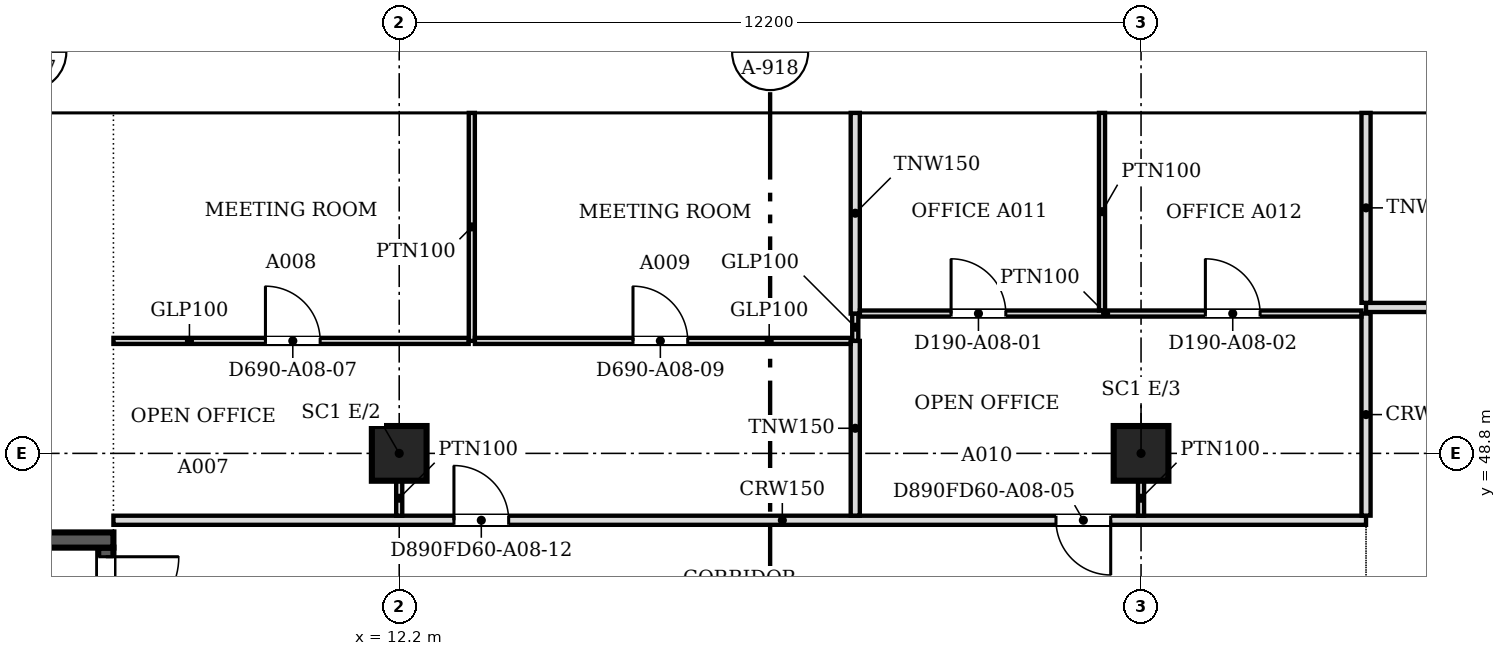
"""IFC4 building model, lengths in metres.
Left out: names, types, materials, properties, quantities, classifications, styles, units other than length and angle.
Written with IfcOpenShell. Run it as: python <this file> out.ifc"""

import sys

from ifc_helpers import new_model, si_unit, direction, frame, frame_2d, origin, origin_2d, place, context, subcontext, project, spatial, polyline, rectangle, outline, extrude, faceted_brep, source, transform, mapped, element, fill, save


model = new_model("IFC4")
c1 = context("Model", 3, precision=1e-05, world=origin(), true_north=direction((0.0, 1.0)))
c2 = subcontext(c1, "Body", "Model", "MODEL_VIEW")
j1 = project(units=[si_unit("LENGTHUNIT", "METRE"), si_unit("PLANEANGLEUNIT", "RADIAN")], contexts=[c1])
p1 = place(None, origin())
s1 = spatial("IfcSite", under=j1, at=p1, CompositionType="ELEMENT")
p2 = place(p1, origin())
s2 = spatial("IfcBuilding", under=s1, at=p2, CompositionType="ELEMENT")
p3 = place(p2, frame((0.0, 0.0, 91.4)))
s3 = spatial("IfcBuildingStorey", under=s2, at=p3, CompositionType="ELEMENT", Elevation=91.4)
for number, where, z_axis, x_axis in (
    (1, (12.2, 48.8, 0.0), (0.0, 0.0, 1.0), (1.0, 0.0, 0.0)),
    (2, (24.4, 48.8, 0.0), (0.0, 0.0, 1.0), (1.0, 0.0, 0.0)),
):
    element("IfcColumn", number, at=place(p3, frame(where, z_axis=z_axis, x_axis=x_axis)), inside=s3, PredefinedType="COLUMN", context=c2, shape_type="SweptSolid", body=[
        extrude(rectangle(XDim=0.9, YDim=0.9, at=origin_2d()), origin(), (0.0, 0.0, 1.0), 3.6),
    ])
m1 = source(origin(), c2, "Body", "SweptSolid", [
    extrude(outline(polyline([(3.05, 0.0), (6.1, 3.8), (3.05, 7.6), (0.0, 3.8), (3.05, 0.0)])), frame((0.0, 0.25, 0.0), z_axis=(0.0, -1.0, 0.0), x_axis=(1.0, 0.0, 0.0)), (0.0, 0.0, 1.0), 0.5),
])
p4 = place(p3, frame((33.55, 54.65, -3.8), z_axis=(0.0, 0.0, 1.0), x_axis=(-1.0, 0.0, 0.0)))
e3 = element("IfcWall", 3, at=p4, inside=s3, PredefinedType="SOLIDWALL", context=c2, shape_type="MappedRepresentation", body=[
    mapped(m1, transform((0.0, 0.0, 0.0), scale=1.0)),
])
m2 = source(origin(), c2, "Body", "SweptSolid", [
    extrude(outline(polyline([(3.05, 0.399), (5.78, 3.8), (3.05, 7.2), (0.321, 3.8), (3.05, 0.399)])), frame((0.0, 0.26, 0.0), z_axis=(0.0, -1.0, 0.0), x_axis=(1.0, 0.0, 0.0)), (0.0, 0.0, 1.0), 0.52),
])
p5 = place(p4, origin())
e4 = element("IfcOpeningElement", 4, at=p5, cuts=e3, PredefinedType="OPENING", context=c2, shape_type="MappedRepresentation", body=[
    mapped(m2, transform((0.0, 0.0, 0.0), scale=1.0)),
])
m3 = source(origin(), c2, "Body", "Brep", [
    faceted_brep([(3.05, -0.25, 0.0), (6.1, -0.25, 3.8), (6.1, -0.25, 3.8), (3.05, -0.25, 7.6), (0.0, -0.25, 3.8), (0.0, 0.25, 3.8), (3.05, 0.25, 7.6), (6.1, 0.25, 3.8), (6.1, 0.25, 3.8), (3.05, 0.25, 0.0)], [[[0, 1, 2, 3, 4]], [[5, 6, 7, 8, 9]], [[9, 8, 1, 0]], [[7, 6, 3, 2]], [[6, 5, 4, 3]], [[5, 9, 0, 4]], [[1, 8, 7, 2]]]),
])
p6 = place(p3, frame((27.45, 54.65, -3.8), z_axis=(0.0, 0.0, 1.0), x_axis=(-1.0, 0.0, 0.0)))
e5 = element("IfcWall", 5, at=p6, inside=s3, PredefinedType="SOLIDWALL", context=c2, shape_type="MappedRepresentation", body=[
    mapped(m3, transform((0.0, 0.0, 0.0), scale=1.0)),
])
p7 = place(p6, origin())
e6 = element("IfcOpeningElement", 6, at=p7, cuts=e5, PredefinedType="OPENING", context=c2, shape_type="MappedRepresentation", body=[
    mapped(m2, transform((0.0, 0.0, 0.0), scale=1.0)),
])
p8 = place(p3, frame((21.35, 54.65, -3.8), z_axis=(0.0, 0.0, 1.0), x_axis=(-1.0, 0.0, 0.0)))
e7 = element("IfcWall", 7, at=p8, inside=s3, PredefinedType="SOLIDWALL", context=c2, shape_type="MappedRepresentation", body=[
    mapped(m1, transform((0.0, 0.0, 0.0), scale=1.0)),
])
p9 = place(p8, origin())
e8 = element("IfcOpeningElement", 8, at=p9, cuts=e7, PredefinedType="OPENING", context=c2, shape_type="MappedRepresentation", body=[
    mapped(m2, transform((0.0, 0.0, 0.0), scale=1.0)),
])
p10 = place(p3, frame((15.25, 54.65, -3.8), z_axis=(0.0, 0.0, 1.0), x_axis=(-1.0, 0.0, 0.0)))
e9 = element("IfcWall", 9, at=p10, inside=s3, PredefinedType="SOLIDWALL", context=c2, shape_type="MappedRepresentation", body=[
    mapped(m1, transform((0.0, 0.0, 0.0), scale=1.0)),
])
p11 = place(p10, origin())
e10 = element("IfcOpeningElement", 10, at=p11, cuts=e9, PredefinedType="OPENING", context=c2, shape_type="MappedRepresentation", body=[
    mapped(m2, transform((0.0, 0.0, 0.0), scale=1.0)),
])
m4 = source(origin(), c2, "Body", "Brep", [
    faceted_brep([(3.003, -0.25, 0.0), (3.05, -0.25, 0.06), (3.05, -0.25, 7.54), (3.003, -0.25, 7.6), (0.0, -0.25, 3.8), (0.0, 0.25, 3.8), (2.957, 0.25, 7.541), (2.957, 0.25, 0.059), (3.003, 0.0, 0.0), (3.003, 0.0, 7.6)], [[[0, 1, 2, 3, 4]], [[5, 6, 7]], [[1, 0, 8]], [[9, 3, 2]], [[6, 5, 4, 3, 9]], [[5, 7, 8, 0, 4]], [[1, 8, 7, 6, 9, 2]]]),
])
p12 = place(p3, frame((9.15, 54.65, -3.8), z_axis=(0.0, 0.0, 1.0), x_axis=(-1.0, 0.0, 0.0)))
e11 = element("IfcWall", 11, at=p12, inside=s3, PredefinedType="SOLIDWALL", context=c2, shape_type="MappedRepresentation", body=[
    mapped(m4, transform((0.0, 0.0, 0.0), scale=1.0)),
])
m5 = source(origin(), c2, "Body", "SweptSolid", [
    extrude(outline(polyline([(2.803, 6.944), (0.319, 3.8), (2.803, 0.656), (2.803, 6.944)])), frame((0.0, 0.26, 0.0), z_axis=(0.0, -1.0, 0.0), x_axis=(1.0, 0.0, 0.0)), (0.0, 0.0, 1.0), 0.52),
])
p13 = place(p12, origin())
e12 = element("IfcOpeningElement", 12, at=p13, cuts=e11, PredefinedType="OPENING", context=c2, shape_type="MappedRepresentation", body=[
    mapped(m5, transform((0.0, 0.0, 0.0), scale=1.0)),
])
p14 = place(p2, frame((0.0, 0.0, 95.2)))
s4 = spatial("IfcBuildingStorey", under=s2, at=p14, CompositionType="ELEMENT", Elevation=95.2)
m6 = source(origin(), c2, "Body", "SweptSolid", [
    extrude(outline(polyline([(3.05, 0.0), (6.1, 3.8), (3.05, 7.6), (0.0, 3.8), (3.05, 0.0)])), frame((0.0, 0.25, 0.0), z_axis=(0.0, -1.0, 0.0), x_axis=(1.0, 0.0, 0.0)), (0.0, 0.0, 1.0), 0.5),
])
p15 = place(p14, frame((30.5, 54.65, -3.8), z_axis=(0.0, 0.0, 1.0), x_axis=(-1.0, 0.0, 0.0)))
e13 = element("IfcWall", 13, at=p15, inside=s4, PredefinedType="SOLIDWALL", context=c2, shape_type="MappedRepresentation", body=[
    mapped(m6, transform((0.0, 0.0, 0.0), scale=1.0)),
])
m7 = source(origin(), c2, "Body", "SweptSolid", [
    extrude(outline(polyline([(3.05, 0.399), (5.78, 3.8), (3.05, 7.201), (0.321, 3.8), (3.05, 0.399)])), frame((0.0, 0.26, 0.0), z_axis=(0.0, -1.0, 0.0), x_axis=(1.0, 0.0, 0.0)), (0.0, 0.0, 1.0), 0.52),
])
p16 = place(p15, origin())
e14 = element("IfcOpeningElement", 14, at=p16, cuts=e13, PredefinedType="OPENING", context=c2, shape_type="MappedRepresentation", body=[
    mapped(m7, transform((0.0, 0.0, 0.0), scale=1.0)),
])
m8 = source(origin(), c2, "Body", "Brep", [
    faceted_brep([(3.05, -0.25, 0.0), (6.1, -0.25, 3.8), (6.1, -0.25, 3.8), (3.05, -0.25, 7.6), (0.0, -0.25, 3.8), (0.0, 0.25, 3.8), (3.05, 0.25, 7.6), (6.1, 0.25, 3.8), (6.1, 0.25, 3.8), (3.05, 0.25, 0.0)], [[[0, 1, 2, 3, 4]], [[5, 6, 7, 8, 9]], [[9, 8, 1, 0]], [[7, 6, 3, 2]], [[6, 5, 4, 3]], [[5, 9, 0, 4]], [[1, 8, 7, 2]]]),
])
p17 = place(p14, frame((24.4, 54.65, -3.8), z_axis=(0.0, 0.0, 1.0), x_axis=(-1.0, 0.0, 0.0)))
e15 = element("IfcWall", 15, at=p17, inside=s4, PredefinedType="SOLIDWALL", context=c2, shape_type="MappedRepresentation", body=[
    mapped(m8, transform((0.0, 0.0, 0.0), scale=1.0)),
])
p18 = place(p17, origin())
e16 = element("IfcOpeningElement", 16, at=p18, cuts=e15, PredefinedType="OPENING", context=c2, shape_type="MappedRepresentation", body=[
    mapped(m7, transform((0.0, 0.0, 0.0), scale=1.0)),
])
p19 = place(p14, frame((18.3, 54.65, -3.8), z_axis=(0.0, 0.0, 1.0), x_axis=(-1.0, 0.0, 0.0)))
e17 = element("IfcWall", 17, at=p19, inside=s4, PredefinedType="SOLIDWALL", context=c2, shape_type="MappedRepresentation", body=[
    mapped(m6, transform((0.0, 0.0, 0.0), scale=1.0)),
])
p20 = place(p19, origin())
e18 = element("IfcOpeningElement", 18, at=p20, cuts=e17, PredefinedType="OPENING", context=c2, shape_type="MappedRepresentation", body=[
    mapped(m7, transform((0.0, 0.0, 0.0), scale=1.0)),
])
m9 = source(origin(), c2, "Body", "Brep", [
    faceted_brep([(3.05, -0.25, 0.0), (6.053, -0.25, 3.8), (3.05, -0.25, 7.6), (0.0, -0.25, 3.8), (0.0, 0.25, 3.8), (3.05, 0.25, 7.6), (6.007, 0.25, 3.859), (6.007, 0.25, 3.741), (3.05, 0.25, 0.0), (6.053, 0.0, 3.8)], [[[0, 1, 2, 3]], [[4, 5, 6, 7, 8]], [[8, 7, 9, 1, 0]], [[6, 5, 2, 1, 9]], [[5, 4, 3, 2]], [[4, 8, 0, 3]], [[9, 7, 6]]]),
])
p21 = place(p14, frame((12.2, 54.65, -3.8), z_axis=(0.0, 0.0, 1.0), x_axis=(-1.0, 0.0, 0.0)))
e19 = element("IfcWall", 19, at=p21, inside=s4, PredefinedType="SOLIDWALL", context=c2, shape_type="MappedRepresentation", body=[
    mapped(m9, transform((0.0, 0.0, 0.0), scale=1.0)),
])
m10 = source(origin(), c2, "Body", "SweptSolid", [
    extrude(outline(polyline([(3.049, 0.401), (5.735, 3.8), (3.049, 7.199), (0.321, 3.8), (3.049, 0.401)])), frame((0.0, 0.26, 0.0), z_axis=(0.0, -1.0, 0.0), x_axis=(1.0, 0.0, 0.0)), (0.0, 0.0, 1.0), 0.52),
])
p22 = place(p21, origin())
e20 = element("IfcOpeningElement", 20, at=p22, cuts=e19, PredefinedType="OPENING", context=c2, shape_type="MappedRepresentation", body=[
    mapped(m10, transform((0.0, 0.0, 0.0), scale=1.0)),
])
p23 = place(p3, frame((3.6, 47.375, 0.0), z_axis=(0.0, 0.0, 1.0), x_axis=(1.0, 0.0, 0.0)))
e21 = element("IfcWall", 21, at=p23, inside=s3, PredefinedType="SOLIDWALL", context=c2, shape_type="SweptSolid", body=[
    extrude(rectangle(XDim=3.9, YDim=0.25, at=frame_2d((1.95, 0.0))), origin(), (0.0, 0.0, 1.0), 3.8),
])
p24 = place(p3, frame((7.375, 47.25, 0.0), z_axis=(0.0, 0.0, 1.0), x_axis=(0.0, -1.0, 0.0)))
e22 = element("IfcWall", 22, at=p24, inside=s3, PredefinedType="SOLIDWALL", context=c2, shape_type="SweptSolid", body=[
    extrude(rectangle(XDim=8.0, YDim=0.25, at=frame_2d((4.0, 0.0))), origin(), (0.0, 0.0, 1.0), 3.8),
])
m11 = source(origin(), c2, "Body", "SweptSolid", [
    extrude(rectangle(XDim=1.2, YDim=2.1, at=frame_2d((0.6, 1.05))), frame((0.0, 0.135, 0.0), z_axis=(0.0, -1.0, 0.0), x_axis=(1.0, 0.0, 0.0)), (0.0, 0.0, 1.0), 0.27),
])
p25 = place(p24, frame((0.15, 0.0, 0.0)))
e23 = element("IfcOpeningElement", 23, at=p25, cuts=e22, PredefinedType="OPENING", context=c2, shape_type="MappedRepresentation", body=[
    mapped(m11, transform((0.0, 0.0, 0.0), scale=1.0)),
])
p26 = place(p3, frame((7.5, 47.7, 0.0), z_axis=(0.0, 0.0, 1.0), x_axis=(1.0, 0.0, 0.0)))
e24 = element("IfcWall", 24, at=p26, inside=s3, PredefinedType="PARTITIONING", context=c2, shape_type="SweptSolid", body=[
    extrude(rectangle(XDim=20.6, YDim=0.15, at=frame_2d((10.3, 0.0))), origin(), (0.0, 0.0, 1.0), 2.895),
])
m12 = source(origin(), c2, "Body", "SweptSolid", [
    extrude(rectangle(XDim=0.9, YDim=2.1, at=frame_2d((0.45, 1.05))), frame((0.0, 0.085, 0.0), z_axis=(0.0, -1.0, 0.0), x_axis=(1.0, 0.0, 0.0)), (0.0, 0.0, 1.0), 0.17),
])
p27 = place(p26, frame((15.501, 0.0, 0.0)))
e25 = element("IfcOpeningElement", 25, at=p27, cuts=e24, PredefinedType="OPENING", context=c2, shape_type="MappedRepresentation", body=[
    mapped(m12, transform((0.0, 0.0, 0.0), scale=1.0)),
])
p28 = place(p26, frame((5.6, 0.0, 0.0)))
e26 = element("IfcOpeningElement", 26, at=p28, cuts=e24, PredefinedType="OPENING", context=c2, shape_type="MappedRepresentation", body=[
    mapped(m12, transform((0.0, 0.0, 0.0), scale=1.0)),
])
p29 = place(p3, frame((19.7, 47.776, 0.0), z_axis=(0.0, 0.0, 1.0), x_axis=(0.0, 1.0, 0.0)))
e27 = element("IfcWall", 27, at=p29, inside=s3, PredefinedType="PARTITIONING", context=c2, shape_type="SweptSolid", body=[
    extrude(rectangle(XDim=2.874, YDim=0.15, at=frame_2d((1.437, 0.0))), origin(), (0.0, 0.0, 1.0), 2.895),
])
p30 = place(p3, frame((28.1, 47.776, 0.0), z_axis=(0.0, 0.0, 1.0), x_axis=(0.0, 1.0, 0.0)))
e28 = element("IfcWall", 28, at=p30, inside=s3, PredefinedType="PARTITIONING", context=c2, shape_type="SweptSolid", body=[
    extrude(rectangle(XDim=3.324, YDim=0.15, at=frame_2d((1.662, 0.0))), origin(), (0.0, 0.0, 1.0), 2.895),
])
for number, where, z_axis, x_axis in (
    (29, (12.2, 48.35, 0.0), (0.0, 0.0, 1.0), (0.0, -1.0, 0.0)),
    (30, (24.4, 48.35, 0.0), (0.0, 0.0, 1.0), (0.0, -1.0, 0.0)),
):
    element("IfcWall", number, at=place(p3, frame(where, z_axis=z_axis, x_axis=x_axis)), inside=s3, PredefinedType="PARTITIONING", context=c2, shape_type="SweptSolid", body=[
        extrude(rectangle(XDim=0.575, YDim=0.1, at=frame_2d((0.288, 0.0))), origin(), (0.0, 0.0, 1.0), 2.895),
    ])
p31 = place(p3, frame((7.5, 50.65, 0.0), z_axis=(0.0, 0.0, 1.0), x_axis=(1.0, 0.0, 0.0)))
e31 = element("IfcWall", 31, at=p31, inside=s3, PredefinedType="PARTITIONING", context=c2, shape_type="SweptSolid", body=[
    extrude(rectangle(XDim=5.843, YDim=0.1, at=frame_2d((2.921, 0.0))), origin(), (0.0, 0.0, 1.0), 2.895),
])
m13 = source(origin(), c2, "Body", "SweptSolid", [
    extrude(rectangle(XDim=0.9, YDim=2.1, at=frame_2d((0.45, 1.05))), frame((0.0, 0.06, 0.0), z_axis=(0.0, -1.0, 0.0), x_axis=(1.0, 0.0, 0.0)), (0.0, 0.0, 1.0), 0.12),
])
p32 = place(p31, frame((2.5, 0.0, 0.0)))
e32 = element("IfcOpeningElement", 32, at=p32, cuts=e31, PredefinedType="OPENING", context=c2, shape_type="MappedRepresentation", body=[
    mapped(m13, transform((0.0, 0.0, 0.0), scale=1.0)),
])
p33 = place(p3, frame((13.394, 50.65, 0.0), z_axis=(0.0, 0.0, 1.0), x_axis=(0.0, 1.0, 0.0)))
e33 = element("IfcWall", 33, at=p33, inside=s3, PredefinedType="PARTITIONING", context=c2, shape_type="SweptSolid", body=[
    extrude(rectangle(XDim=3.75, YDim=0.1, at=frame_2d((1.875, 0.0))), origin(), (0.0, 0.0, 1.0), 2.895),
])
p34 = place(p3, frame((13.445, 50.65, 0.0), z_axis=(0.0, 0.0, 1.0), x_axis=(1.0, 0.0, 0.0)))
e34 = element("IfcWall", 34, at=p34, inside=s3, PredefinedType="PARTITIONING", context=c2, shape_type="SweptSolid", body=[
    extrude(rectangle(XDim=6.179, YDim=0.1, at=frame_2d((3.09, 0.0))), origin(), (0.0, 0.0, 1.0), 2.895),
])
p35 = place(p34, frame((2.6, 0.0, 0.0)))
e35 = element("IfcOpeningElement", 35, at=p35, cuts=e34, PredefinedType="OPENING", context=c2, shape_type="MappedRepresentation", body=[
    mapped(m13, transform((0.0, 0.0, 0.0), scale=1.0)),
])
p36 = place(p3, frame((19.7, 50.651, 0.0), z_axis=(0.0, 0.0, 1.0), x_axis=(0.0, 1.0, 0.0)))
e36 = element("IfcWall", 36, at=p36, inside=s3, PredefinedType="PARTITIONING", context=c2, shape_type="SweptSolid", body=[
    extrude(rectangle(XDim=0.448, YDim=0.1, at=frame_2d((0.224, 0.0))), origin(), (0.0, 0.0, 1.0), 2.895),
])
p37 = place(p3, frame((19.7, 51.1, 0.0), z_axis=(0.0, 0.0, 1.0), x_axis=(0.0, 1.0, 0.0)))
e37 = element("IfcWall", 37, at=p37, inside=s3, PredefinedType="PARTITIONING", context=c2, shape_type="SweptSolid", body=[
    extrude(rectangle(XDim=3.3, YDim=0.15, at=frame_2d((1.65, 0.0))), origin(), (0.0, 0.0, 1.0), 2.895),
])
p38 = place(p3, frame((19.776, 51.1, 0.0), z_axis=(0.0, 0.0, 1.0), x_axis=(1.0, 0.0, 0.0)))
e38 = element("IfcWall", 38, at=p38, inside=s3, PredefinedType="PARTITIONING", context=c2, shape_type="SweptSolid", body=[
    extrude(rectangle(XDim=8.248, YDim=0.1, at=frame_2d((4.124, 0.0))), origin(), (0.0, 0.0, 1.0), 2.895),
])
p39 = place(p38, frame((1.5, 0.0, 0.0)))
e39 = element("IfcOpeningElement", 39, at=p39, cuts=e38, PredefinedType="OPENING", context=c2, shape_type="MappedRepresentation", body=[
    mapped(m13, transform((0.0, 0.0, 0.0), scale=1.0)),
])
p40 = place(p38, frame((5.682, 0.0, 0.0)))
e40 = element("IfcOpeningElement", 40, at=p40, cuts=e38, PredefinedType="OPENING", context=c2, shape_type="MappedRepresentation", body=[
    mapped(m13, transform((0.0, 0.0, 0.0), scale=1.0)),
])
p41 = place(p3, frame((23.758, 51.151, 0.0), z_axis=(0.0, 0.0, 1.0), x_axis=(0.0, 1.0, 0.0)))
e41 = element("IfcWall", 41, at=p41, inside=s3, PredefinedType="PARTITIONING", context=c2, shape_type="SweptSolid", body=[
    extrude(rectangle(XDim=3.249, YDim=0.1, at=frame_2d((1.625, 0.0))), origin(), (0.0, 0.0, 1.0), 2.895),
])
p42 = place(p3, frame((28.1, 51.2, 0.0), z_axis=(0.0, 0.0, 1.0), x_axis=(1.0, 0.0, 0.0)))
e42 = element("IfcWall", 42, at=p42, inside=s3, PredefinedType="PARTITIONING", context=c2, shape_type="SweptSolid", body=[
    extrude(rectangle(XDim=31.438, YDim=0.15, at=frame_2d((15.719, 0.0))), origin(), (0.0, 0.0, 1.0), 2.895),
])
p43 = place(p42, frame((13.251, 0.0, 0.0)))
e43 = element("IfcOpeningElement", 43, at=p43, cuts=e42, PredefinedType="OPENING", context=c2, shape_type="MappedRepresentation", body=[
    mapped(m12, transform((0.0, 0.0, 0.0), scale=1.0)),
])
p44 = place(p42, frame((4.1, 0.0, 0.0)))
e44 = element("IfcOpeningElement", 44, at=p44, cuts=e42, PredefinedType="OPENING", context=c2, shape_type="MappedRepresentation", body=[
    mapped(m12, transform((0.0, 0.0, 0.0), scale=1.0)),
])
p45 = place(p42, frame((24.4, 0.0, 0.0)))
e45 = element("IfcOpeningElement", 45, at=p45, cuts=e42, PredefinedType="OPENING", context=c2, shape_type="MappedRepresentation", body=[
    mapped(m12, transform((0.0, 0.0, 0.0), scale=1.0)),
])
p46 = place(p3, frame((28.1, 51.276, 0.0), z_axis=(0.0, 0.0, 1.0), x_axis=(0.0, 1.0, 0.0)))
e46 = element("IfcWall", 46, at=p46, inside=s3, PredefinedType="PARTITIONING", context=c2, shape_type="SweptSolid", body=[
    extrude(rectangle(XDim=3.124, YDim=0.15, at=frame_2d((1.562, 0.0))), origin(), (0.0, 0.0, 1.0), 2.895),
])
m14 = source(origin(), c2, "Body", "SweptSolid", [
    extrude(rectangle(XDim=1.2, YDim=2.1, at=frame_2d((0.6, 1.05))), frame((0.0, 0.025, 0.0), z_axis=(0.0, -1.0, 0.0), x_axis=(1.0, 0.0, 0.0)), (0.0, 0.0, 1.0), 0.05),
])
p47 = place(p25, origin())
e47 = element("IfcDoor", 47, at=p47, inside=s3, OperationType="SINGLE_SWING_LEFT", PredefinedType="DOOR", context=c2, shape_type="MappedRepresentation", body=[
    mapped(m14, transform((0.0, 0.0, 0.0), scale=1.0)),
])
fill(e23, e47)
m15 = source(origin(), c2, "Body", "SweptSolid", [
    extrude(rectangle(XDim=0.9, YDim=2.1, at=frame_2d((0.45, 1.05))), frame((0.0, 0.025, 0.0), z_axis=(0.0, -1.0, 0.0), x_axis=(1.0, 0.0, 0.0)), (0.0, 0.0, 1.0), 0.05),
])
p48 = place(p39, origin())
e48 = element("IfcDoor", 48, at=p48, inside=s3, OperationType="SINGLE_SWING_LEFT", PredefinedType="DOOR", context=c2, shape_type="MappedRepresentation", body=[
    mapped(m15, transform((0.0, 0.0, 0.0), scale=1.0)),
])
fill(e39, e48)
p49 = place(p40, origin())
e49 = element("IfcDoor", 49, at=p49, inside=s3, OperationType="SINGLE_SWING_LEFT", PredefinedType="DOOR", context=c2, shape_type="MappedRepresentation", body=[
    mapped(m15, transform((0.0, 0.0, 0.0), scale=1.0)),
])
fill(e40, e49)
p50 = place(p32, origin())
e50 = element("IfcDoor", 50, at=p50, inside=s3, OperationType="SINGLE_SWING_LEFT", PredefinedType="DOOR", context=c2, shape_type="MappedRepresentation", body=[
    mapped(m15, transform((0.0, 0.0, 0.0), scale=1.0)),
])
fill(e32, e50)
p51 = place(p35, origin())
e51 = element("IfcDoor", 51, at=p51, inside=s3, OperationType="SINGLE_SWING_LEFT", PredefinedType="DOOR", context=c2, shape_type="MappedRepresentation", body=[
    mapped(m15, transform((0.0, 0.0, 0.0), scale=1.0)),
])
fill(e35, e51)
p52 = place(p27, origin())
e52 = element("IfcDoor", 52, at=p52, inside=s3, OperationType="SINGLE_SWING_RIGHT", PredefinedType="DOOR", context=c2, shape_type="MappedRepresentation", body=[
    mapped(m15, transform((0.0, 0.0, 0.0), scale=1.0)),
])
fill(e25, e52)
p53 = place(p28, origin())
e53 = element("IfcDoor", 53, at=p53, inside=s3, OperationType="SINGLE_SWING_LEFT", PredefinedType="DOOR", context=c2, shape_type="MappedRepresentation", body=[
    mapped(m15, transform((0.0, 0.0, 0.0), scale=1.0)),
])
fill(e26, e53)
save(model, sys.argv[1])
